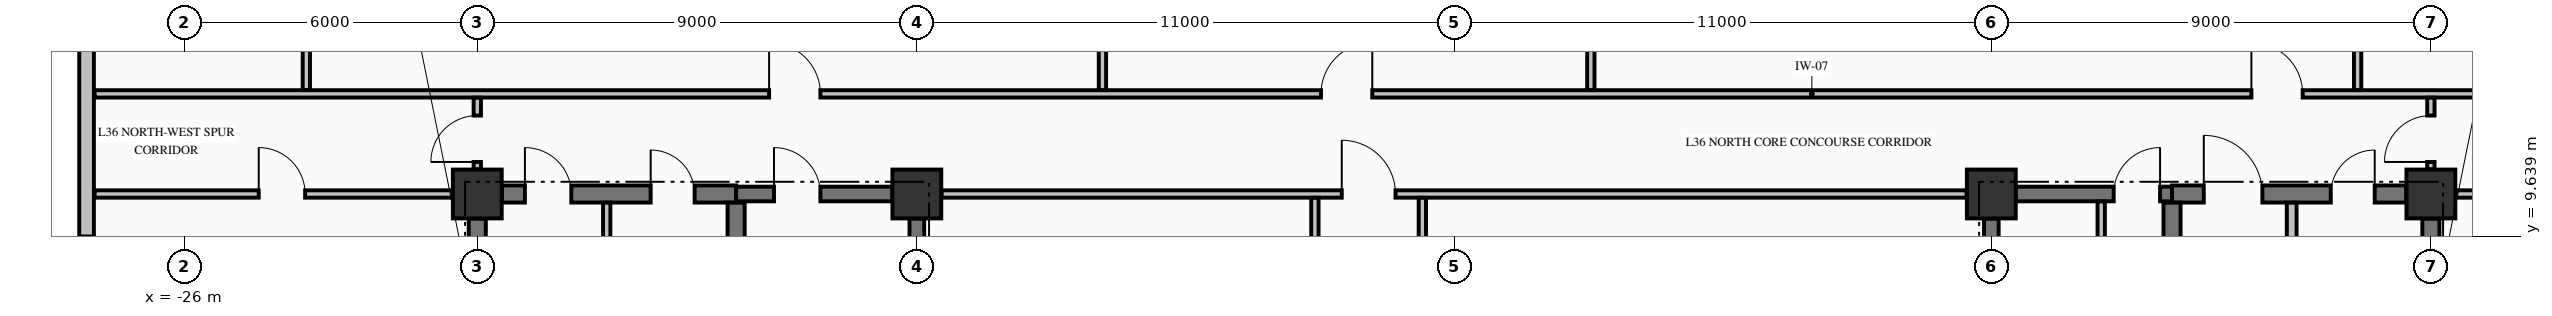
"""IFC4 building model, lengths in metres.
Left out: names, types, materials, properties, quantities, classifications, styles, units other than length and angle.
Written with IfcOpenShell. Run it as: python <this file> out.ifc"""

import sys

from ifc_helpers import new_model, si_unit, direction, frame, frame_2d, origin, origin_2d, place, context, subcontext, project, spatial, rectangle, extrude, element, fill, save


model = new_model("IFC4")
c1 = context("Model", 3, precision=1e-05, world=origin(), true_north=direction((0.0, 1.0)))
c2 = subcontext(c1, "Body", "Model", "MODEL_VIEW")
j1 = project(units=[si_unit("LENGTHUNIT", "METRE"), si_unit("PLANEANGLEUNIT", "RADIAN")], contexts=[c1])
p1 = place(None, origin())
s1 = spatial("IfcSite", under=j1, at=p1, CompositionType="ELEMENT")
p2 = place(p1, origin())
s2 = spatial("IfcBuilding", under=s1, at=p2, CompositionType="ELEMENT")
p3 = place(p2, frame((0.0, 0.0, 142.77)))
s3 = spatial("IfcBuildingStorey", under=s2, at=p3, CompositionType="ELEMENT", Elevation=142.77)
for number, where, z_axis, x_axis in (
    (1, (-20.0, 10.5, -0.325), (0.0, 0.0, 1.0), (1.0, 0.0, 0.0)),
    (2, (-11.0, 10.5, -0.325), (0.0, 0.0, 1.0), (1.0, 0.0, 0.0)),
    (3, (11.0, 10.5, -0.325), (0.0, 0.0, 1.0), (1.0, 0.0, 0.0)),
    (4, (20.0, 10.5, -0.325), (0.0, 0.0, 1.0), (1.0, 0.0, 0.0)),
):
    element("IfcColumn", number, at=place(p3, frame(where, z_axis=z_axis, x_axis=x_axis)), inside=s3, PredefinedType="COLUMN", context=c2, shape_type="SweptSolid", body=[
        extrude(rectangle(XDim=1.0, YDim=1.0, at=origin_2d()), origin(), (0.0, 0.0, 1.0), 3.645),
    ])
p4 = place(p3, frame((-28.0, 20.37, 0.0), z_axis=(0.0, 0.0, 1.0), x_axis=(0.0, -1.0, 0.0)))
e5 = element("IfcWall", 5, at=p4, inside=s3, PredefinedType="STANDARD", context=c2, shape_type="SweptSolid", body=[
    extrude(rectangle(XDim=10.74, YDim=0.3, at=frame_2d((5.37, 0.0))), origin(), (0.0, 0.0, 1.0), 2.712),
])
p5 = place(p3, frame((-19.496, 10.5, 0.0), z_axis=(0.0, 0.0, 1.0), x_axis=(1.0, 0.0, 0.0)))
e6 = element("IfcWall", 6, at=p5, inside=s3, PredefinedType="SHEAR", context=c2, shape_type="SweptSolid", body=[
    extrude(rectangle(XDim=4.796, YDim=0.35, at=frame_2d((2.398, 0.0))), origin(), (0.0, 0.0, 1.0), 3.32),
])
p6 = place(p5, frame((0.471, 0.0, 0.0)))
e7 = element("IfcOpeningElement", 7, at=p6, cuts=e6, PredefinedType="OPENING", context=c2, shape_type="SweptSolid", body=[
    extrude(rectangle(XDim=0.95, YDim=2.15, at=frame_2d((0.475, 1.075))), frame((0.0, 0.185, 0.0), z_axis=(0.0, -1.0, 0.0), x_axis=(1.0, 0.0, 0.0)), (0.0, 0.0, 1.0), 0.37),
])
p7 = place(p5, frame((3.046, 0.0, 0.0)))
e8 = element("IfcOpeningElement", 8, at=p7, cuts=e6, PredefinedType="OPENING", context=c2, shape_type="SweptSolid", body=[
    extrude(rectangle(XDim=0.9, YDim=2.15, at=frame_2d((0.45, 1.075))), frame((0.0, 0.185, 0.0), z_axis=(0.0, -1.0, 0.0), x_axis=(1.0, 0.0, 0.0)), (0.0, 0.0, 1.0), 0.37),
])
p8 = place(p3, frame((-14.7, 10.5, 0.0), z_axis=(0.0, 0.0, 1.0), x_axis=(1.0, 0.0, 0.0)))
e9 = element("IfcWall", 9, at=p8, inside=s3, PredefinedType="SHEAR", context=c2, shape_type="SweptSolid", body=[
    extrude(rectangle(XDim=3.196, YDim=0.3, at=frame_2d((1.598, 0.0))), origin(), (0.0, 0.0, 1.0), 3.32),
])
p9 = place(p8, frame((0.775, 0.0, 0.0)))
e10 = element("IfcOpeningElement", 10, at=p9, cuts=e9, PredefinedType="OPENING", context=c2, shape_type="SweptSolid", body=[
    extrude(rectangle(XDim=0.95, YDim=2.15, at=frame_2d((0.475, 1.075))), frame((0.0, 0.16, 0.0), z_axis=(0.0, -1.0, 0.0), x_axis=(1.0, 0.0, 0.0)), (0.0, 0.0, 1.0), 0.32),
])
p10 = place(p3, frame((11.504, 10.5, 0.0), z_axis=(0.0, 0.0, 1.0), x_axis=(1.0, 0.0, 0.0)))
e11 = element("IfcWall", 11, at=p10, inside=s3, PredefinedType="SHEAR", context=c2, shape_type="SweptSolid", body=[
    extrude(rectangle(XDim=3.196, YDim=0.3, at=frame_2d((1.598, 0.0))), origin(), (0.0, 0.0, 1.0), 3.32),
])
p11 = place(p10, frame((2.001, 0.0, 0.0)))
e12 = element("IfcOpeningElement", 12, at=p11, cuts=e11, PredefinedType="OPENING", context=c2, shape_type="SweptSolid", body=[
    extrude(rectangle(XDim=0.95, YDim=2.15, at=frame_2d((0.475, 1.075))), frame((0.0, 0.16, 0.0), z_axis=(0.0, -1.0, 0.0), x_axis=(1.0, 0.0, 0.0)), (0.0, 0.0, 1.0), 0.32),
])
p12 = place(p3, frame((14.7, 10.5, 0.0), z_axis=(0.0, 0.0, 1.0), x_axis=(1.0, 0.0, 0.0)))
e13 = element("IfcWall", 13, at=p12, inside=s3, PredefinedType="SHEAR", context=c2, shape_type="SweptSolid", body=[
    extrude(rectangle(XDim=4.796, YDim=0.35, at=frame_2d((2.398, 0.0))), origin(), (0.0, 0.0, 1.0), 3.32),
])
p13 = place(p12, frame((0.65, 0.0, 0.0)))
e14 = element("IfcOpeningElement", 14, at=p13, cuts=e13, PredefinedType="OPENING", context=c2, shape_type="SweptSolid", body=[
    extrude(rectangle(XDim=1.2, YDim=2.15, at=frame_2d((0.6, 1.075))), frame((0.0, 0.185, 0.0), z_axis=(0.0, -1.0, 0.0), x_axis=(1.0, 0.0, 0.0)), (0.0, 0.0, 1.0), 0.37),
])
p14 = place(p12, frame((3.25, 0.0, 0.0)))
e15 = element("IfcOpeningElement", 15, at=p14, cuts=e13, PredefinedType="OPENING", context=c2, shape_type="SweptSolid", body=[
    extrude(rectangle(XDim=0.9, YDim=2.15, at=frame_2d((0.45, 1.075))), frame((0.0, 0.185, 0.0), z_axis=(0.0, -1.0, 0.0), x_axis=(1.0, 0.0, 0.0)), (0.0, 0.0, 1.0), 0.37),
])
p15 = place(p3, frame((-27.835, 10.5, 0.0), z_axis=(0.0, 0.0, 1.0), x_axis=(1.0, 0.0, 0.0)))
e16 = element("IfcWall", 16, at=p15, inside=s3, PredefinedType="PARTITIONING", context=c2, shape_type="SweptSolid", body=[
    extrude(rectangle(XDim=7.329, YDim=0.15, at=frame_2d((3.665, 0.0))), origin(), (0.0, 0.0, 1.0), 3.32),
])
p16 = place(p15, frame((3.36, 0.0, 0.0)))
e17 = element("IfcOpeningElement", 17, at=p16, cuts=e16, PredefinedType="OPENING", context=c2, shape_type="SweptSolid", body=[
    extrude(rectangle(XDim=0.95, YDim=2.15, at=frame_2d((0.475, 1.075))), frame((0.0, 0.085, 0.0), z_axis=(0.0, -1.0, 0.0), x_axis=(1.0, 0.0, 0.0)), (0.0, 0.0, 1.0), 0.17),
])
p17 = place(p3, frame((-10.494, 10.5, 0.0), z_axis=(0.0, 0.0, 1.0), x_axis=(1.0, 0.0, 0.0)))
e18 = element("IfcWall", 18, at=p17, inside=s3, PredefinedType="PARTITIONING", context=c2, shape_type="SweptSolid", body=[
    extrude(rectangle(XDim=20.988, YDim=0.15, at=frame_2d((10.494, 0.0))), origin(), (0.0, 0.0, 1.0), 3.32),
])
p18 = place(p17, frame((8.194, 0.0, 0.0)))
e19 = element("IfcOpeningElement", 19, at=p18, cuts=e18, PredefinedType="OPENING", context=c2, shape_type="SweptSolid", body=[
    extrude(rectangle(XDim=1.1, YDim=2.15, at=frame_2d((0.55, 1.075))), frame((0.0, 0.085, 0.0), z_axis=(0.0, -1.0, 0.0), x_axis=(1.0, 0.0, 0.0)), (0.0, 0.0, 1.0), 0.17),
])
p19 = place(p3, frame((20.506, 10.5, 0.0), z_axis=(0.0, 0.0, 1.0), x_axis=(1.0, 0.0, 0.0)))
e20 = element("IfcWall", 20, at=p19, inside=s3, PredefinedType="PARTITIONING", context=c2, shape_type="SweptSolid", body=[
    extrude(rectangle(XDim=2.329, YDim=0.15, at=frame_2d((1.165, 0.0))), origin(), (0.0, 0.0, 1.0), 3.32),
])
p20 = place(p19, frame((0.494, 0.0, 0.0)))
e21 = element("IfcOpeningElement", 21, at=p20, cuts=e20, PredefinedType="OPENING", context=c2, shape_type="SweptSolid", body=[
    extrude(rectangle(XDim=1.0, YDim=2.15, at=frame_2d((0.5, 1.075))), frame((0.0, 0.085, 0.0), z_axis=(0.0, -1.0, 0.0), x_axis=(1.0, 0.0, 0.0)), (0.0, 0.0, 1.0), 0.17),
])
p21 = place(p3, frame((-27.835, 12.55, 0.0), z_axis=(0.0, 0.0, 1.0), x_axis=(1.0, 0.0, 0.0)))
e22 = element("IfcWall", 22, at=p21, inside=s3, PredefinedType="PARTITIONING", context=c2, shape_type="SweptSolid", body=[
    extrude(rectangle(XDim=50.67, YDim=0.15, at=frame_2d((25.335, 0.0))), origin(), (0.0, 0.0, 1.0), 3.32),
])
p22 = place(p21, frame((13.81, 0.0, 0.0)))
e23 = element("IfcOpeningElement", 23, at=p22, cuts=e22, PredefinedType="OPENING", context=c2, shape_type="SweptSolid", body=[
    extrude(rectangle(XDim=1.05, YDim=2.15, at=frame_2d((0.525, 1.075))), frame((0.0, 0.085, 0.0), z_axis=(0.0, -1.0, 0.0), x_axis=(1.0, 0.0, 0.0)), (0.0, 0.0, 1.0), 0.17),
])
p23 = place(p21, frame((25.11, 0.0, 0.0)))
e24 = element("IfcOpeningElement", 24, at=p23, cuts=e22, PredefinedType="OPENING", context=c2, shape_type="SweptSolid", body=[
    extrude(rectangle(XDim=1.05, YDim=2.15, at=frame_2d((0.525, 1.075))), frame((0.0, 0.085, 0.0), z_axis=(0.0, -1.0, 0.0), x_axis=(1.0, 0.0, 0.0)), (0.0, 0.0, 1.0), 0.17),
])
p24 = place(p21, frame((44.16, 0.0, 0.0)))
e25 = element("IfcOpeningElement", 25, at=p24, cuts=e22, PredefinedType="OPENING", context=c2, shape_type="SweptSolid", body=[
    extrude(rectangle(XDim=1.05, YDim=2.15, at=frame_2d((0.525, 1.075))), frame((0.0, 0.085, 0.0), z_axis=(0.0, -1.0, 0.0), x_axis=(1.0, 0.0, 0.0)), (0.0, 0.0, 1.0), 0.17),
])
p25 = place(p3, frame((-20.0, 0.504, 0.0), z_axis=(0.0, 0.0, 1.0), x_axis=(0.0, 1.0, 0.0)))
e26 = element("IfcWall", 26, at=p25, inside=s3, PredefinedType="SHEAR", context=c2, shape_type="SweptSolid", body=[
    extrude(rectangle(XDim=9.492, YDim=0.35, at=frame_2d((4.746, 0.0))), origin(), (0.0, 0.0, 1.0), 3.32),
])
p26 = place(p3, frame((-14.7, 5.852, 0.0), z_axis=(0.0, 0.0, 1.0), x_axis=(0.0, 1.0, 0.0)))
e27 = element("IfcWall", 27, at=p26, inside=s3, PredefinedType="SHEAR", context=c2, shape_type="SweptSolid", body=[
    extrude(rectangle(XDim=4.471, YDim=0.35, at=frame_2d((2.235, 0.0))), origin(), (0.0, 0.0, 1.0), 3.32),
])
for number, where, z_axis, x_axis in (
    (28, (-11.0, 5.852, 0.0), (0.0, 0.0, 1.0), (0.0, 1.0, 0.0)),
    (29, (11.0, 5.852, 0.0), (0.0, 0.0, 1.0), (0.0, 1.0, 0.0)),
):
    element("IfcWall", number, at=place(p3, frame(where, z_axis=z_axis, x_axis=x_axis)), inside=s3, PredefinedType="SHEAR", context=c2, shape_type="SweptSolid", body=[
        extrude(rectangle(XDim=4.144, YDim=0.3, at=frame_2d((2.072, 0.0))), origin(), (0.0, 0.0, 1.0), 3.32),
    ])
p27 = place(p3, frame((14.7, 5.852, 0.0), z_axis=(0.0, 0.0, 1.0), x_axis=(0.0, 1.0, 0.0)))
e30 = element("IfcWall", 30, at=p27, inside=s3, PredefinedType="SHEAR", context=c2, shape_type="SweptSolid", body=[
    extrude(rectangle(XDim=4.471, YDim=0.35, at=frame_2d((2.235, 0.0))), origin(), (0.0, 0.0, 1.0), 3.32),
])
p28 = place(p3, frame((20.0, 5.377, 0.0), z_axis=(0.0, 0.0, 1.0), x_axis=(0.0, 1.0, 0.0)))
e31 = element("IfcWall", 31, at=p28, inside=s3, PredefinedType="SHEAR", context=c2, shape_type="SweptSolid", body=[
    extrude(rectangle(XDim=4.619, YDim=0.35, at=frame_2d((2.31, 0.0))), origin(), (0.0, 0.0, 1.0), 3.32),
])
p29 = place(p3, frame((-23.5, 12.628, 0.0), z_axis=(0.0, 0.0, 1.0), x_axis=(0.0, 1.0, 0.0)))
e32 = element("IfcWall", 32, at=p29, inside=s3, PredefinedType="PARTITIONING", context=c2, shape_type="SweptSolid", body=[
    extrude(rectangle(XDim=7.766, YDim=0.15, at=frame_2d((3.883, 0.0))), origin(), (0.0, 0.0, 1.0), 3.32),
])
p30 = place(p3, frame((-20.0, 11.006, 0.0), z_axis=(0.0, 0.0, 1.0), x_axis=(0.0, 1.0, 0.0)))
e33 = element("IfcWall", 33, at=p30, inside=s3, PredefinedType="PARTITIONING", context=c2, shape_type="SweptSolid", body=[
    extrude(rectangle(XDim=1.466, YDim=0.15, at=frame_2d((0.733, 0.0))), origin(), (0.0, 0.0, 1.0), 2.81),
])
p31 = place(p30, frame((0.15, 0.0, 0.0)))
e34 = element("IfcOpeningElement", 34, at=p31, cuts=e33, PredefinedType="OPENING", context=c2, shape_type="SweptSolid", body=[
    extrude(rectangle(XDim=0.95, YDim=2.15, at=frame_2d((0.475, 1.075))), frame((0.0, 0.085, 0.0), z_axis=(0.0, -1.0, 0.0), x_axis=(1.0, 0.0, 0.0)), (0.0, 0.0, 1.0), 0.17),
])
p32 = place(p3, frame((-17.35, 5.178, 0.0), z_axis=(0.0, 0.0, 1.0), x_axis=(0.0, 1.0, 0.0)))
e35 = element("IfcWall", 35, at=p32, inside=s3, PredefinedType="PARTITIONING", context=c2, shape_type="SweptSolid", body=[
    extrude(rectangle(XDim=5.144, YDim=0.15, at=frame_2d((2.572, 0.0))), origin(), (0.0, 0.0, 1.0), 3.32),
])
p33 = place(p3, frame((-7.2, 12.628, 0.0), z_axis=(0.0, 0.0, 1.0), x_axis=(0.0, 1.0, 0.0)))
e36 = element("IfcWall", 36, at=p33, inside=s3, PredefinedType="PARTITIONING", context=c2, shape_type="SweptSolid", body=[
    extrude(rectangle(XDim=12.707, YDim=0.15, at=frame_2d((6.354, 0.0))), origin(), (0.0, 0.0, 1.0), 3.32),
])
for number, where, z_axis, x_axis in (
    (37, (-2.85, 2.978, 0.0), (0.0, 0.0, 1.0), (0.0, 1.0, 0.0)),
    (38, (-0.65, 2.978, 0.0), (0.0, 0.0, 1.0), (0.0, 1.0, 0.0)),
):
    element("IfcWall", number, at=place(p3, frame(where, z_axis=z_axis, x_axis=x_axis)), inside=s3, PredefinedType="PARTITIONING", context=c2, shape_type="SweptSolid", body=[
        extrude(rectangle(XDim=7.444, YDim=0.15, at=frame_2d((3.722, 0.0))), origin(), (0.0, 0.0, 1.0), 3.32),
    ])
p34 = place(p3, frame((2.8, 12.628, 0.0), z_axis=(0.0, 0.0, 1.0), x_axis=(0.0, 1.0, 0.0)))
e39 = element("IfcWall", 39, at=p34, inside=s3, PredefinedType="PARTITIONING", context=c2, shape_type="SweptSolid", body=[
    extrude(rectangle(XDim=12.812, YDim=0.15, at=frame_2d((6.406, 0.0))), origin(), (0.0, 0.0, 1.0), 3.32),
])
p35 = place(p3, frame((13.25, 5.853, 0.0), z_axis=(0.0, 0.0, 1.0), x_axis=(0.0, 1.0, 0.0)))
e40 = element("IfcWall", 40, at=p35, inside=s3, PredefinedType="PARTITIONING", context=c2, shape_type="SweptSolid", body=[
    extrude(rectangle(XDim=4.494, YDim=0.15, at=frame_2d((2.247, 0.0))), origin(), (0.0, 0.0, 1.0), 3.32),
])
p36 = place(p35, frame((1.472, 0.0, 0.0)))
e41 = element("IfcOpeningElement", 41, at=p36, cuts=e40, PredefinedType="OPENING", context=c2, shape_type="SweptSolid", body=[
    extrude(rectangle(XDim=0.95, YDim=2.15, at=frame_2d((0.475, 1.075))), frame((0.0, 0.085, 0.0), z_axis=(0.0, -1.0, 0.0), x_axis=(1.0, 0.0, 0.0)), (0.0, 0.0, 1.0), 0.17),
])
p37 = place(p3, frame((17.15, 5.378, 0.0), z_axis=(0.0, 0.0, 1.0), x_axis=(0.0, 1.0, 0.0)))
e42 = element("IfcWall", 42, at=p37, inside=s3, PredefinedType="PARTITIONING", context=c2, shape_type="SweptSolid", body=[
    extrude(rectangle(XDim=4.944, YDim=0.2, at=frame_2d((2.472, 0.0))), origin(), (0.0, 0.0, 1.0), 3.32),
])
p38 = place(p3, frame((18.5, 12.628, 0.0), z_axis=(0.0, 0.0, 1.0), x_axis=(0.0, 1.0, 0.0)))
e43 = element("IfcWall", 43, at=p38, inside=s3, PredefinedType="PARTITIONING", context=c2, shape_type="SweptSolid", body=[
    extrude(rectangle(XDim=7.766, YDim=0.15, at=frame_2d((3.883, 0.0))), origin(), (0.0, 0.0, 1.0), 3.32),
])
p39 = place(p3, frame((20.0, 11.006, 0.0), z_axis=(0.0, 0.0, 1.0), x_axis=(0.0, 1.0, 0.0)))
e44 = element("IfcWall", 44, at=p39, inside=s3, PredefinedType="PARTITIONING", context=c2, shape_type="SweptSolid", body=[
    extrude(rectangle(XDim=1.466, YDim=0.15, at=frame_2d((0.733, 0.0))), origin(), (0.0, 0.0, 1.0), 2.81),
])
p40 = place(p39, frame((0.15, 0.0, 0.0)))
e45 = element("IfcOpeningElement", 45, at=p40, cuts=e44, PredefinedType="OPENING", context=c2, shape_type="SweptSolid", body=[
    extrude(rectangle(XDim=0.95, YDim=2.15, at=frame_2d((0.475, 1.075))), frame((0.0, 0.085, 0.0), z_axis=(0.0, -1.0, 0.0), x_axis=(1.0, 0.0, 0.0)), (0.0, 0.0, 1.0), 0.17),
])
p41 = place(p9, origin())
e46 = element("IfcDoor", 46, at=p41, inside=s3, OperationType="SINGLE_SWING_LEFT", PredefinedType="DOOR", context=c2, shape_type="SweptSolid", body=[
    extrude(rectangle(XDim=0.95, YDim=2.15, at=frame_2d((0.475, 1.075))), frame((0.0, 0.025, 0.0), z_axis=(0.0, -1.0, 0.0), x_axis=(1.0, 0.0, 0.0)), (0.0, 0.0, 1.0), 0.05),
])
fill(e10, e46)
p42 = place(p11, origin())
e47 = element("IfcDoor", 47, at=p42, inside=s3, OperationType="SINGLE_SWING_RIGHT", PredefinedType="DOOR", context=c2, shape_type="SweptSolid", body=[
    extrude(rectangle(XDim=0.95, YDim=2.15, at=frame_2d((0.475, 1.075))), frame((0.0, 0.025, 0.0), z_axis=(0.0, -1.0, 0.0), x_axis=(1.0, 0.0, 0.0)), (0.0, 0.0, 1.0), 0.05),
])
fill(e12, e47)
p43 = place(p6, origin())
e48 = element("IfcDoor", 48, at=p43, inside=s3, OperationType="SINGLE_SWING_LEFT", PredefinedType="DOOR", context=c2, shape_type="SweptSolid", body=[
    extrude(rectangle(XDim=0.95, YDim=2.15, at=frame_2d((0.475, 1.075))), frame((0.0, 0.025, 0.0), z_axis=(0.0, -1.0, 0.0), x_axis=(1.0, 0.0, 0.0)), (0.0, 0.0, 1.0), 0.05),
])
fill(e7, e48)
p44 = place(p7, origin())
e49 = element("IfcDoor", 49, at=p44, inside=s3, OperationType="SINGLE_SWING_LEFT", PredefinedType="DOOR", context=c2, shape_type="SweptSolid", body=[
    extrude(rectangle(XDim=0.9, YDim=2.15, at=frame_2d((0.45, 1.075))), frame((0.0, 0.025, 0.0), z_axis=(0.0, -1.0, 0.0), x_axis=(1.0, 0.0, 0.0)), (0.0, 0.0, 1.0), 0.05),
])
fill(e8, e49)
p45 = place(p13, origin())
e50 = element("IfcDoor", 50, at=p45, inside=s3, OperationType="SINGLE_SWING_LEFT", PredefinedType="DOOR", context=c2, shape_type="SweptSolid", body=[
    extrude(rectangle(XDim=1.2, YDim=2.15, at=frame_2d((0.6, 1.075))), frame((0.0, 0.025, 0.0), z_axis=(0.0, -1.0, 0.0), x_axis=(1.0, 0.0, 0.0)), (0.0, 0.0, 1.0), 0.05),
])
fill(e14, e50)
p46 = place(p14, origin())
e51 = element("IfcDoor", 51, at=p46, inside=s3, OperationType="SINGLE_SWING_RIGHT", PredefinedType="DOOR", context=c2, shape_type="SweptSolid", body=[
    extrude(rectangle(XDim=0.9, YDim=2.15, at=frame_2d((0.45, 1.075))), frame((0.0, 0.025, 0.0), z_axis=(0.0, -1.0, 0.0), x_axis=(1.0, 0.0, 0.0)), (0.0, 0.0, 1.0), 0.05),
])
fill(e15, e51)
p47 = place(p18, origin())
e52 = element("IfcDoor", 52, at=p47, inside=s3, OperationType="SINGLE_SWING_LEFT", PredefinedType="DOOR", context=c2, shape_type="SweptSolid", body=[
    extrude(rectangle(XDim=1.1, YDim=2.15, at=frame_2d((0.55, 1.075))), frame((0.0, 0.025, 0.0), z_axis=(0.0, -1.0, 0.0), x_axis=(1.0, 0.0, 0.0)), (0.0, 0.0, 1.0), 0.05),
])
fill(e19, e52)
p48 = place(p22, origin())
e53 = element("IfcDoor", 53, at=p48, inside=s3, OperationType="SINGLE_SWING_LEFT", PredefinedType="DOOR", context=c2, shape_type="SweptSolid", body=[
    extrude(rectangle(XDim=1.05, YDim=2.15, at=frame_2d((0.525, 1.075))), frame((0.0, 0.025, 0.0), z_axis=(0.0, -1.0, 0.0), x_axis=(1.0, 0.0, 0.0)), (0.0, 0.0, 1.0), 0.05),
])
fill(e23, e53)
p49 = place(p23, origin())
e54 = element("IfcDoor", 54, at=p49, inside=s3, OperationType="SINGLE_SWING_RIGHT", PredefinedType="DOOR", context=c2, shape_type="SweptSolid", body=[
    extrude(rectangle(XDim=1.05, YDim=2.15, at=frame_2d((0.525, 1.075))), frame((0.0, 0.025, 0.0), z_axis=(0.0, -1.0, 0.0), x_axis=(1.0, 0.0, 0.0)), (0.0, 0.0, 1.0), 0.05),
])
fill(e24, e54)
p50 = place(p24, origin())
e55 = element("IfcDoor", 55, at=p50, inside=s3, OperationType="SINGLE_SWING_LEFT", PredefinedType="DOOR", context=c2, shape_type="SweptSolid", body=[
    extrude(rectangle(XDim=1.05, YDim=2.15, at=frame_2d((0.525, 1.075))), frame((0.0, 0.025, 0.0), z_axis=(0.0, -1.0, 0.0), x_axis=(1.0, 0.0, 0.0)), (0.0, 0.0, 1.0), 0.05),
])
fill(e25, e55)
p51 = place(p31, origin())
e56 = element("IfcDoor", 56, at=p51, inside=s3, OperationType="SINGLE_SWING_LEFT", PredefinedType="DOOR", context=c2, shape_type="SweptSolid", body=[
    extrude(rectangle(XDim=0.95, YDim=2.15, at=frame_2d((0.475, 1.075))), frame((0.0, 0.025, 0.0), z_axis=(0.0, -1.0, 0.0), x_axis=(1.0, 0.0, 0.0)), (0.0, 0.0, 1.0), 0.05),
])
fill(e34, e56)
p52 = place(p16, origin())
e57 = element("IfcDoor", 57, at=p52, inside=s3, OperationType="SINGLE_SWING_LEFT", PredefinedType="DOOR", context=c2, shape_type="SweptSolid", body=[
    extrude(rectangle(XDim=0.95, YDim=2.15, at=frame_2d((0.475, 1.075))), frame((0.0, 0.025, 0.0), z_axis=(0.0, -1.0, 0.0), x_axis=(1.0, 0.0, 0.0)), (0.0, 0.0, 1.0), 0.05),
])
fill(e17, e57)
p53 = place(p40, origin())
e58 = element("IfcDoor", 58, at=p53, inside=s3, OperationType="SINGLE_SWING_LEFT", PredefinedType="DOOR", context=c2, shape_type="SweptSolid", body=[
    extrude(rectangle(XDim=0.95, YDim=2.15, at=frame_2d((0.475, 1.075))), frame((0.0, 0.025, 0.0), z_axis=(0.0, -1.0, 0.0), x_axis=(1.0, 0.0, 0.0)), (0.0, 0.0, 1.0), 0.05),
])
fill(e45, e58)
save(model, sys.argv[1])
